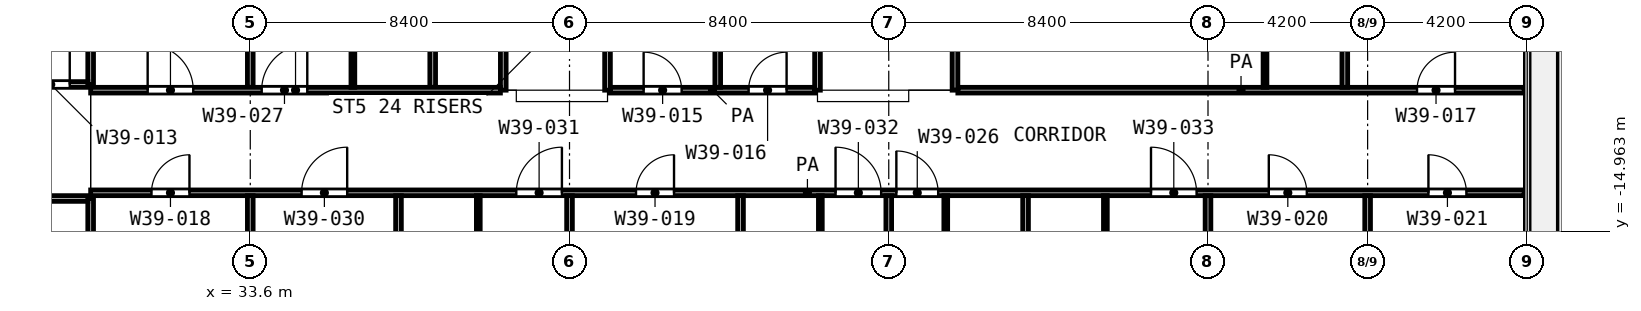
"""IFC4 building model, lengths in metres.
Left out: names, types, materials, properties, quantities, classifications, styles, units other than length and angle.
Written with IfcOpenShell. Run it as: python <this file> out.ifc"""

import sys

from ifc_helpers import new_model, si_unit, direction, frame, frame_2d, origin, place, context, subcontext, project, spatial, rectangle, extrude, element, fill, save


model = new_model("IFC4")
c1 = context("Model", 3, precision=1e-05, world=origin(), true_north=direction((0.0, 1.0)))
c2 = subcontext(c1, "Body", "Model", "MODEL_VIEW")
j1 = project(units=[si_unit("LENGTHUNIT", "METRE"), si_unit("PLANEANGLEUNIT", "RADIAN")], contexts=[c1])
p1 = place(None, origin())
s1 = spatial("IfcSite", under=j1, at=p1, CompositionType="ELEMENT")
p2 = place(p1, origin())
s2 = spatial("IfcBuilding", under=s1, at=p2, CompositionType="ELEMENT")
p3 = place(p2, frame((0.0, 0.0, 171.0)))
s3 = spatial("IfcBuildingStorey", under=s2, at=p3, CompositionType="ELEMENT", Elevation=171.0)
for number, where, z_axis, x_axis in (
    (1, (36.3, -11.175, 0.0), (0.0, 0.0, 1.0), (0.0, 1.0, 0.0)),
    (2, (39.6, -16.65, 0.0), (0.0, 0.0, 1.0), (0.0, 1.0, 0.0)),
    (3, (48.6, -16.65, 0.0), (0.0, 0.0, 1.0), (0.0, 1.0, 0.0)),
    (4, (51.9, -16.65, 0.0), (0.0, 0.0, 1.0), (0.0, 1.0, 0.0)),
    (5, (56.1, -16.65, 0.0), (0.0, 0.0, 1.0), (0.0, 1.0, 0.0)),
):
    element("IfcWall", number, at=place(p3, frame(where, z_axis=z_axis, x_axis=x_axis)), inside=s3, PredefinedType="PARTITIONING", context=c2, shape_type="SweptSolid", body=[
        extrude(rectangle(XDim=2.625, YDim=0.1, at=frame_2d((1.312, 0.0))), origin(), (0.0, 0.0, 1.0), 3.6),
    ])
p4 = place(p3, frame((60.3, -11.175, 0.0), z_axis=(0.0, 0.0, 1.0), x_axis=(0.0, 1.0, 0.0)))
e6 = element("IfcWall", 6, at=p4, inside=s3, PredefinedType="PARTITIONING", context=c2, shape_type="SweptSolid", body=[
    extrude(rectangle(XDim=2.624, YDim=0.1, at=frame_2d((1.312, 0.0))), origin(), (0.0, 0.0, 1.0), 3.6),
])
p5 = place(p3, frame((24.9, -14.1, 0.0), z_axis=(0.0, 0.0, 1.0), x_axis=(1.0, 0.0, 0.0)))
e7 = element("IfcWall", 7, at=p5, inside=s3, PredefinedType="PARTITIONING", context=c2, shape_type="SweptSolid", body=[
    extrude(rectangle(XDim=4.425, YDim=0.15, at=frame_2d((2.212, 0.0))), origin(), (0.0, 0.0, 1.0), 3.6),
])
p6 = place(p5, frame((1.65, 0.0, 0.0)))
e8 = element("IfcOpeningElement", 8, at=p6, cuts=e7, PredefinedType="OPENING", context=c2, shape_type="SweptSolid", body=[
    extrude(rectangle(XDim=1.5, YDim=2.1, at=frame_2d((0.75, 1.05))), frame((0.0, 0.085, 0.0), z_axis=(0.0, -1.0, 0.0), x_axis=(1.0, 0.0, 0.0)), (0.0, 0.0, 1.0), 0.17),
])
p7 = place(p3, frame((29.4, -13.95, 0.0), z_axis=(0.0, 0.0, 1.0), x_axis=(1.0, 0.0, 0.0)))
e9 = element("IfcWall", 9, at=p7, inside=s3, PredefinedType="PARTITIONING", context=c2, shape_type="SweptSolid", body=[
    extrude(rectangle(XDim=37.72, YDim=0.15, at=frame_2d((18.86, 0.0))), origin(), (0.0, 0.0, 1.0), 3.6),
])
p8 = place(p7, frame((1.6, 0.0, 0.0)))
e10 = element("IfcOpeningElement", 10, at=p8, cuts=e9, PredefinedType="OPENING", context=c2, shape_type="SweptSolid", body=[
    extrude(rectangle(XDim=1.0, YDim=2.1, at=frame_2d((0.5, 1.05))), frame((0.0, 0.085, 0.0), z_axis=(0.0, -1.0, 0.0), x_axis=(1.0, 0.0, 0.0)), (0.0, 0.0, 1.0), 0.17),
])
p9 = place(p7, frame((5.55, 0.0, 0.0)))
e11 = element("IfcOpeningElement", 11, at=p9, cuts=e9, PredefinedType="OPENING", context=c2, shape_type="SweptSolid", body=[
    extrude(rectangle(XDim=1.2, YDim=2.1, at=frame_2d((0.6, 1.05))), frame((0.0, 0.085, 0.0), z_axis=(0.0, -1.0, 0.0), x_axis=(1.0, 0.0, 0.0)), (0.0, 0.0, 1.0), 0.17),
])
p10 = place(p7, frame((11.2, 0.0, 0.0)))
e12 = element("IfcOpeningElement", 12, at=p10, cuts=e9, PredefinedType="OPENING", context=c2, shape_type="SweptSolid", body=[
    extrude(rectangle(XDim=1.2, YDim=2.1, at=frame_2d((0.6, 1.05))), frame((0.0, 0.085, 0.0), z_axis=(0.0, -1.0, 0.0), x_axis=(1.0, 0.0, 0.0)), (0.0, 0.0, 1.0), 0.17),
])
p11 = place(p7, frame((14.35, 0.0, 0.0)))
e13 = element("IfcOpeningElement", 13, at=p11, cuts=e9, PredefinedType="OPENING", context=c2, shape_type="SweptSolid", body=[
    extrude(rectangle(XDim=1.0, YDim=2.1, at=frame_2d((0.5, 1.05))), frame((0.0, 0.085, 0.0), z_axis=(0.0, -1.0, 0.0), x_axis=(1.0, 0.0, 0.0)), (0.0, 0.0, 1.0), 0.17),
])
p12 = place(p7, frame((19.6, 0.0, 0.0)))
e14 = element("IfcOpeningElement", 14, at=p12, cuts=e9, PredefinedType="OPENING", context=c2, shape_type="SweptSolid", body=[
    extrude(rectangle(XDim=1.2, YDim=2.1, at=frame_2d((0.6, 1.05))), frame((0.0, 0.085, 0.0), z_axis=(0.0, -1.0, 0.0), x_axis=(1.0, 0.0, 0.0)), (0.0, 0.0, 1.0), 0.17),
])
p13 = place(p7, frame((21.2, 0.0, 0.0)))
e15 = element("IfcOpeningElement", 15, at=p13, cuts=e9, PredefinedType="OPENING", context=c2, shape_type="SweptSolid", body=[
    extrude(rectangle(XDim=1.1, YDim=2.1, at=frame_2d((0.55, 1.05))), frame((0.0, 0.085, 0.0), z_axis=(0.0, -1.0, 0.0), x_axis=(1.0, 0.0, 0.0)), (0.0, 0.0, 1.0), 0.17),
])
p14 = place(p7, frame((27.9, 0.0, 0.0)))
e16 = element("IfcOpeningElement", 16, at=p14, cuts=e9, PredefinedType="OPENING", context=c2, shape_type="SweptSolid", body=[
    extrude(rectangle(XDim=1.2, YDim=2.1, at=frame_2d((0.6, 1.05))), frame((0.0, 0.085, 0.0), z_axis=(0.0, -1.0, 0.0), x_axis=(1.0, 0.0, 0.0)), (0.0, 0.0, 1.0), 0.17),
])
p15 = place(p7, frame((31.0, 0.0, 0.0)))
e17 = element("IfcOpeningElement", 17, at=p15, cuts=e9, PredefinedType="OPENING", context=c2, shape_type="SweptSolid", body=[
    extrude(rectangle(XDim=1.0, YDim=2.1, at=frame_2d((0.5, 1.05))), frame((0.0, 0.085, 0.0), z_axis=(0.0, -1.0, 0.0), x_axis=(1.0, 0.0, 0.0)), (0.0, 0.0, 1.0), 0.17),
])
p16 = place(p7, frame((35.2, 0.0, 0.0)))
e18 = element("IfcOpeningElement", 18, at=p16, cuts=e9, PredefinedType="OPENING", context=c2, shape_type="SweptSolid", body=[
    extrude(rectangle(XDim=1.0, YDim=2.1, at=frame_2d((0.5, 1.05))), frame((0.0, 0.085, 0.0), z_axis=(0.0, -1.0, 0.0), x_axis=(1.0, 0.0, 0.0)), (0.0, 0.0, 1.0), 0.17),
])
p17 = place(p3, frame((29.4, -11.25, 0.0), z_axis=(0.0, 0.0, 1.0), x_axis=(1.0, 0.0, 0.0)))
e19 = element("IfcWall", 19, at=p17, inside=s3, PredefinedType="PARTITIONING", context=c2, shape_type="SweptSolid", body=[
    extrude(rectangle(XDim=10.782, YDim=0.15, at=frame_2d((5.391, 0.0))), origin(), (0.0, 0.0, 1.0), 3.6),
])
p18 = place(p17, frame((4.5, 0.0, 0.0)))
e20 = element("IfcOpeningElement", 20, at=p18, cuts=e19, PredefinedType="OPENING", context=c2, shape_type="SweptSolid", body=[
    extrude(rectangle(XDim=1.2, YDim=2.1, at=frame_2d((0.6, 1.05))), frame((0.0, 0.085, 0.0), z_axis=(0.0, -1.0, 0.0), x_axis=(1.0, 0.0, 0.0)), (0.0, 0.0, 1.0), 0.17),
])
p19 = place(p17, frame((1.5, 0.0, 0.0)))
e21 = element("IfcOpeningElement", 21, at=p19, cuts=e19, PredefinedType="OPENING", context=c2, shape_type="SweptSolid", body=[
    extrude(rectangle(XDim=1.2, YDim=2.1, at=frame_2d((0.6, 1.05))), frame((0.0, 0.085, 0.0), z_axis=(0.0, -1.0, 0.0), x_axis=(1.0, 0.0, 0.0)), (0.0, 0.0, 1.0), 0.17),
])
p20 = place(p3, frame((43.075, -11.25, 0.0), z_axis=(0.0, 0.0, 1.0), x_axis=(1.0, 0.0, 0.0)))
e22 = element("IfcWall", 22, at=p20, inside=s3, PredefinedType="PARTITIONING", context=c2, shape_type="SweptSolid", body=[
    extrude(rectangle(XDim=5.375, YDim=0.15, at=frame_2d((2.688, 0.0))), origin(), (0.0, 0.0, 1.0), 3.6),
])
p21 = place(p20, frame((0.875, 0.0, 0.0)))
e23 = element("IfcOpeningElement", 23, at=p21, cuts=e22, PredefinedType="OPENING", context=c2, shape_type="SweptSolid", body=[
    extrude(rectangle(XDim=1.0, YDim=2.1, at=frame_2d((0.5, 1.05))), frame((0.0, 0.085, 0.0), z_axis=(0.0, -1.0, 0.0), x_axis=(1.0, 0.0, 0.0)), (0.0, 0.0, 1.0), 0.17),
])
p22 = place(p20, frame((3.637, 0.0, 0.0)))
e24 = element("IfcOpeningElement", 24, at=p22, cuts=e22, PredefinedType="OPENING", context=c2, shape_type="SweptSolid", body=[
    extrude(rectangle(XDim=1.0, YDim=2.1, at=frame_2d((0.5, 1.05))), frame((0.0, 0.085, 0.0), z_axis=(0.0, -1.0, 0.0), x_axis=(1.0, 0.0, 0.0)), (0.0, 0.0, 1.0), 0.17),
])
p23 = place(p3, frame((52.218, -11.25, 0.0), z_axis=(0.0, 0.0, 1.0), x_axis=(1.0, 0.0, 0.0)))
e25 = element("IfcWall", 25, at=p23, inside=s3, PredefinedType="PARTITIONING", context=c2, shape_type="SweptSolid", body=[
    extrude(rectangle(XDim=14.902, YDim=0.15, at=frame_2d((7.451, 0.0))), origin(), (0.0, 0.0, 1.0), 3.6),
])
p24 = place(p23, frame((12.082, 0.0, 0.0)))
e26 = element("IfcOpeningElement", 26, at=p24, cuts=e25, PredefinedType="OPENING", context=c2, shape_type="SweptSolid", body=[
    extrude(rectangle(XDim=1.0, YDim=2.1, at=frame_2d((0.5, 1.05))), frame((0.0, 0.085, 0.0), z_axis=(0.0, -1.0, 0.0), x_axis=(1.0, 0.0, 0.0)), (0.0, 0.0, 1.0), 0.17),
])
p25 = place(p3, frame((24.9, -11.1, 0.0), z_axis=(0.0, 0.0, 1.0), x_axis=(1.0, 0.0, 0.0)))
e27 = element("IfcWall", 27, at=p25, inside=s3, PredefinedType="PARTITIONING", context=c2, shape_type="SweptSolid", body=[
    extrude(rectangle(XDim=4.425, YDim=0.15, at=frame_2d((2.212, 0.0))), origin(), (0.0, 0.0, 1.0), 3.6),
])
p26 = place(p25, frame((0.9, 0.0, 0.0)))
e28 = element("IfcOpeningElement", 28, at=p26, cuts=e27, PredefinedType="OPENING", context=c2, shape_type="SweptSolid", body=[
    extrude(rectangle(XDim=0.9, YDim=2.1, at=frame_2d((0.45, 1.05))), frame((0.0, 0.085, 0.0), z_axis=(0.0, -1.0, 0.0), x_axis=(1.0, 0.0, 0.0)), (0.0, 0.0, 1.0), 0.17),
])
p27 = place(p25, frame((2.95, 0.0, 0.0)))
e29 = element("IfcOpeningElement", 29, at=p27, cuts=e27, PredefinedType="OPENING", context=c2, shape_type="SweptSolid", body=[
    extrude(rectangle(XDim=1.0, YDim=2.1, at=frame_2d((0.5, 1.05))), frame((0.0, 0.085, 0.0), z_axis=(0.0, -1.0, 0.0), x_axis=(1.0, 0.0, 0.0)), (0.0, 0.0, 1.0), 0.17),
])
p28 = place(p3, frame((29.4, -31.198, 0.0), z_axis=(0.0, 0.0, 1.0), x_axis=(0.0, 1.0, 0.0)))
e30 = element("IfcWall", 30, at=p28, inside=s3, PredefinedType="PARTITIONING", context=c2, shape_type="SweptSolid", body=[
    extrude(rectangle(XDim=17.098, YDim=0.15, at=frame_2d((8.549, 0.0))), origin(), (0.0, 0.0, 1.0), 3.6),
])
p29 = place(p3, frame((29.4, -11.1, 0.0), z_axis=(0.0, 0.0, 1.0), x_axis=(0.0, 1.0, 0.0)))
e31 = element("IfcWall", 31, at=p29, inside=s3, PredefinedType="PARTITIONING", context=c2, shape_type="SweptSolid", body=[
    extrude(rectangle(XDim=11.02, YDim=0.15, at=frame_2d((5.51, 0.0))), origin(), (0.0, 0.0, 1.0), 2.7),
])
p30 = place(p3, frame((33.6, -31.12, 0.0), z_axis=(0.0, 0.0, 1.0), x_axis=(0.0, 1.0, 0.0)))
e32 = element("IfcWall", 32, at=p30, inside=s3, PredefinedType="PARTITIONING", context=c2, shape_type="SweptSolid", body=[
    extrude(rectangle(XDim=17.095, YDim=0.15, at=frame_2d((8.548, 0.0))), origin(), (0.0, 0.0, 1.0), 3.6),
])
p31 = place(p3, frame((33.6, -11.175, 0.0), z_axis=(0.0, 0.0, 1.0), x_axis=(0.0, 1.0, 0.0)))
e33 = element("IfcWall", 33, at=p31, inside=s3, PredefinedType="PARTITIONING", context=c2, shape_type="SweptSolid", body=[
    extrude(rectangle(XDim=11.095, YDim=0.15, at=frame_2d((5.547, 0.0))), origin(), (0.0, 0.0, 1.0), 3.6),
])
p32 = place(p3, frame((37.5, -31.12, 0.0), z_axis=(0.0, 0.0, 1.0), x_axis=(0.0, 1.0, 0.0)))
e34 = element("IfcWall", 34, at=p32, inside=s3, PredefinedType="PARTITIONING", context=c2, shape_type="SweptSolid", body=[
    extrude(rectangle(XDim=17.095, YDim=0.15, at=frame_2d((8.548, 0.0))), origin(), (0.0, 0.0, 1.0), 3.6),
])
p33 = place(p3, frame((38.4, -11.175, 0.0), z_axis=(0.0, 0.0, 1.0), x_axis=(0.0, 1.0, 0.0)))
e35 = element("IfcWall", 35, at=p33, inside=s3, PredefinedType="PARTITIONING", context=c2, shape_type="SweptSolid", body=[
    extrude(rectangle(XDim=11.095, YDim=0.15, at=frame_2d((5.547, 0.0))), origin(), (0.0, 0.0, 1.0), 2.7),
])
p34 = place(p3, frame((40.257, -11.25, 0.0), z_axis=(0.0, 0.0, 1.0), x_axis=(0.0, 1.0, 0.0)))
e36 = element("IfcWall", 36, at=p34, inside=s3, PredefinedType="PARTITIONING", context=c2, shape_type="SweptSolid", body=[
    extrude(rectangle(XDim=11.17, YDim=0.15, at=frame_2d((5.585, 0.0))), origin(), (0.0, 0.0, 1.0), 2.7),
])
p35 = place(p34, frame((4.95, 0.0, 0.0)))
e37 = element("IfcOpeningElement", 37, at=p35, cuts=e36, PredefinedType="OPENING", context=c2, shape_type="SweptSolid", body=[
    extrude(rectangle(XDim=1.0, YDim=2.1, at=frame_2d((0.5, 1.05))), frame((0.0, 0.085, 0.0), z_axis=(0.0, -1.0, 0.0), x_axis=(1.0, 0.0, 0.0)), (0.0, 0.0, 1.0), 0.17),
])
p36 = place(p3, frame((42.0, -31.12, 0.0), z_axis=(0.0, 0.0, 1.0), x_axis=(0.0, 1.0, 0.0)))
e38 = element("IfcWall", 38, at=p36, inside=s3, PredefinedType="PARTITIONING", context=c2, shape_type="SweptSolid", body=[
    extrude(rectangle(XDim=17.095, YDim=0.15, at=frame_2d((8.548, 0.0))), origin(), (0.0, 0.0, 1.0), 3.6),
])
p37 = place(p3, frame((43.0, -11.25, 0.0), z_axis=(0.0, 0.0, 1.0), x_axis=(0.0, 1.0, 0.0)))
e39 = element("IfcWall", 39, at=p37, inside=s3, PredefinedType="PARTITIONING", context=c2, shape_type="SweptSolid", body=[
    extrude(rectangle(XDim=2.348, YDim=0.15, at=frame_2d((1.174, 0.0))), origin(), (0.0, 0.0, 1.0), 3.6),
])
p38 = place(p3, frame((45.9, -11.175, 0.0), z_axis=(0.0, 0.0, 1.0), x_axis=(0.0, 1.0, 0.0)))
e40 = element("IfcWall", 40, at=p38, inside=s3, PredefinedType="PARTITIONING", context=c2, shape_type="SweptSolid", body=[
    extrude(rectangle(XDim=2.525, YDim=0.15, at=frame_2d((1.263, 0.0))), origin(), (0.0, 0.0, 1.0), 3.6),
])
p39 = place(p3, frame((46.5, -31.12, 0.0), z_axis=(0.0, 0.0, 1.0), x_axis=(0.0, 1.0, 0.0)))
e41 = element("IfcWall", 41, at=p39, inside=s3, PredefinedType="PARTITIONING", context=c2, shape_type="SweptSolid", body=[
    extrude(rectangle(XDim=17.095, YDim=0.15, at=frame_2d((8.548, 0.0))), origin(), (0.0, 0.0, 1.0), 3.6),
])
p40 = place(p3, frame((48.525, -11.25, 0.0), z_axis=(0.0, 0.0, 1.0), x_axis=(0.0, 1.0, 0.0)))
e42 = element("IfcWall", 42, at=p40, inside=s3, PredefinedType="PARTITIONING", context=c2, shape_type="SweptSolid", body=[
    extrude(rectangle(XDim=2.6, YDim=0.15, at=frame_2d((1.3, 0.0))), origin(), (0.0, 0.0, 1.0), 3.6),
])
p41 = place(p3, frame((50.4, -31.12, 0.0), z_axis=(0.0, 0.0, 1.0), x_axis=(0.0, 1.0, 0.0)))
e43 = element("IfcWall", 43, at=p41, inside=s3, PredefinedType="PARTITIONING", context=c2, shape_type="SweptSolid", body=[
    extrude(rectangle(XDim=17.095, YDim=0.15, at=frame_2d((8.548, 0.0))), origin(), (0.0, 0.0, 1.0), 3.6),
])
p42 = place(p3, frame((52.143, -11.25, 0.0), z_axis=(0.0, 0.0, 1.0), x_axis=(0.0, 1.0, 0.0)))
e44 = element("IfcWall", 44, at=p42, inside=s3, PredefinedType="PARTITIONING", context=c2, shape_type="SweptSolid", body=[
    extrude(rectangle(XDim=9.398, YDim=0.15, at=frame_2d((4.699, 0.0))), origin(), (0.0, 0.0, 1.0), 3.6),
])
p43 = place(p42, frame((5.665, 0.0, 0.0)))
e45 = element("IfcOpeningElement", 45, at=p43, cuts=e44, PredefinedType="OPENING", context=c2, shape_type="SweptSolid", body=[
    extrude(rectangle(XDim=1.2, YDim=2.1, at=frame_2d((0.6, 1.05))), frame((0.0, 0.085, 0.0), z_axis=(0.0, -1.0, 0.0), x_axis=(1.0, 0.0, 0.0)), (0.0, 0.0, 1.0), 0.17),
])
p44 = place(p42, frame((3.333, 0.0, 0.0)))
e46 = element("IfcOpeningElement", 46, at=p44, cuts=e44, PredefinedType="OPENING", context=c2, shape_type="SweptSolid", body=[
    extrude(rectangle(XDim=1.2, YDim=2.1, at=frame_2d((0.6, 1.05))), frame((0.0, 0.085, 0.0), z_axis=(0.0, -1.0, 0.0), x_axis=(1.0, 0.0, 0.0)), (0.0, 0.0, 1.0), 0.17),
])
for number, where, z_axis, x_axis in (
    (47, (54.0, -31.12, 0.0), (0.0, 0.0, 1.0), (0.0, 1.0, 0.0)),
    (48, (58.8, -31.12, 0.0), (0.0, 0.0, 1.0), (0.0, 1.0, 0.0)),
):
    element("IfcWall", number, at=place(p3, frame(where, z_axis=z_axis, x_axis=x_axis)), inside=s3, PredefinedType="PARTITIONING", context=c2, shape_type="SweptSolid", body=[
        extrude(rectangle(XDim=17.095, YDim=0.15, at=frame_2d((8.548, 0.0))), origin(), (0.0, 0.0, 1.0), 3.6),
    ])
p45 = place(p3, frame((62.4, -11.175, 0.0), z_axis=(0.0, 0.0, 1.0), x_axis=(0.0, 1.0, 0.0)))
e49 = element("IfcWall", 49, at=p45, inside=s3, PredefinedType="PARTITIONING", context=c2, shape_type="SweptSolid", body=[
    extrude(rectangle(XDim=9.862, YDim=0.15, at=frame_2d((4.931, 0.0))), origin(), (0.0, 0.0, 1.0), 2.7),
])
p46 = place(p3, frame((63.0, -29.287, 0.0), z_axis=(0.0, 0.0, 1.0), x_axis=(0.0, 1.0, 0.0)))
e50 = element("IfcWall", 50, at=p46, inside=s3, PredefinedType="PARTITIONING", context=c2, shape_type="SweptSolid", body=[
    extrude(rectangle(XDim=15.262, YDim=0.15, at=frame_2d((7.631, 0.0))), origin(), (0.0, 0.0, 1.0), 3.6),
])
p47 = place(p18, origin())
e51 = element("IfcDoor", 51, at=p47, inside=s3, OperationType="SINGLE_SWING_RIGHT", PredefinedType="DOOR", context=c2, shape_type="SweptSolid", body=[
    extrude(rectangle(XDim=1.2, YDim=2.1, at=frame_2d((0.6, 1.05))), frame((0.0, 0.025, 0.0), z_axis=(0.0, -1.0, 0.0), x_axis=(1.0, 0.0, 0.0)), (0.0, 0.0, 1.0), 0.05),
])
fill(e20, e51)
p48 = place(p21, origin())
e52 = element("IfcDoor", 52, at=p48, inside=s3, OperationType="SINGLE_SWING_LEFT", PredefinedType="DOOR", context=c2, shape_type="SweptSolid", body=[
    extrude(rectangle(XDim=1.0, YDim=2.1, at=frame_2d((0.5, 1.05))), frame((0.0, 0.025, 0.0), z_axis=(0.0, -1.0, 0.0), x_axis=(1.0, 0.0, 0.0)), (0.0, 0.0, 1.0), 0.05),
])
fill(e23, e52)
p49 = place(p22, origin())
e53 = element("IfcDoor", 53, at=p49, inside=s3, OperationType="SINGLE_SWING_RIGHT", PredefinedType="DOOR", context=c2, shape_type="SweptSolid", body=[
    extrude(rectangle(XDim=1.0, YDim=2.1, at=frame_2d((0.5, 1.05))), frame((0.0, 0.025, 0.0), z_axis=(0.0, -1.0, 0.0), x_axis=(1.0, 0.0, 0.0)), (0.0, 0.0, 1.0), 0.05),
])
fill(e24, e53)
p50 = place(p24, origin())
e54 = element("IfcDoor", 54, at=p50, inside=s3, OperationType="SINGLE_SWING_RIGHT", PredefinedType="DOOR", context=c2, shape_type="SweptSolid", body=[
    extrude(rectangle(XDim=1.0, YDim=2.1, at=frame_2d((0.5, 1.05))), frame((0.0, 0.025, 0.0), z_axis=(0.0, -1.0, 0.0), x_axis=(1.0, 0.0, 0.0)), (0.0, 0.0, 1.0), 0.05),
])
fill(e26, e54)
p51 = place(p8, origin())
e55 = element("IfcDoor", 55, at=p51, inside=s3, OperationType="SINGLE_SWING_RIGHT", PredefinedType="DOOR", context=c2, shape_type="SweptSolid", body=[
    extrude(rectangle(XDim=1.0, YDim=2.1, at=frame_2d((0.5, 1.05))), frame((0.0, 0.025, 0.0), z_axis=(0.0, -1.0, 0.0), x_axis=(1.0, 0.0, 0.0)), (0.0, 0.0, 1.0), 0.05),
])
fill(e10, e55)
p52 = place(p9, origin())
e56 = element("IfcDoor", 56, at=p52, inside=s3, OperationType="SINGLE_SWING_RIGHT", PredefinedType="DOOR", context=c2, shape_type="SweptSolid", body=[
    extrude(rectangle(XDim=1.2, YDim=2.1, at=frame_2d((0.6, 1.05))), frame((0.0, 0.025, 0.0), z_axis=(0.0, -1.0, 0.0), x_axis=(1.0, 0.0, 0.0)), (0.0, 0.0, 1.0), 0.05),
])
fill(e11, e56)
p53 = place(p10, origin())
e57 = element("IfcDoor", 57, at=p53, inside=s3, OperationType="SINGLE_SWING_RIGHT", PredefinedType="DOOR", context=c2, shape_type="SweptSolid", body=[
    extrude(rectangle(XDim=1.2, YDim=2.1, at=frame_2d((0.6, 1.05))), frame((0.0, 0.025, 0.0), z_axis=(0.0, -1.0, 0.0), x_axis=(1.0, 0.0, 0.0)), (0.0, 0.0, 1.0), 0.05),
])
fill(e12, e57)
p54 = place(p11, origin())
e58 = element("IfcDoor", 58, at=p54, inside=s3, OperationType="SINGLE_SWING_RIGHT", PredefinedType="DOOR", context=c2, shape_type="SweptSolid", body=[
    extrude(rectangle(XDim=1.0, YDim=2.1, at=frame_2d((0.5, 1.05))), frame((0.0, 0.025, 0.0), z_axis=(0.0, -1.0, 0.0), x_axis=(1.0, 0.0, 0.0)), (0.0, 0.0, 1.0), 0.05),
])
fill(e13, e58)
p55 = place(p12, origin())
e59 = element("IfcDoor", 59, at=p55, inside=s3, OperationType="SINGLE_SWING_LEFT", PredefinedType="DOOR", context=c2, shape_type="SweptSolid", body=[
    extrude(rectangle(XDim=1.2, YDim=2.1, at=frame_2d((0.6, 1.05))), frame((0.0, 0.025, 0.0), z_axis=(0.0, -1.0, 0.0), x_axis=(1.0, 0.0, 0.0)), (0.0, 0.0, 1.0), 0.05),
])
fill(e14, e59)
p56 = place(p13, origin())
e60 = element("IfcDoor", 60, at=p56, inside=s3, OperationType="SINGLE_SWING_LEFT", PredefinedType="DOOR", context=c2, shape_type="SweptSolid", body=[
    extrude(rectangle(XDim=1.1, YDim=2.1, at=frame_2d((0.55, 1.05))), frame((0.0, 0.025, 0.0), z_axis=(0.0, -1.0, 0.0), x_axis=(1.0, 0.0, 0.0)), (0.0, 0.0, 1.0), 0.05),
])
fill(e15, e60)
p57 = place(p14, origin())
e61 = element("IfcDoor", 61, at=p57, inside=s3, OperationType="SINGLE_SWING_LEFT", PredefinedType="DOOR", context=c2, shape_type="SweptSolid", body=[
    extrude(rectangle(XDim=1.2, YDim=2.1, at=frame_2d((0.6, 1.05))), frame((0.0, 0.025, 0.0), z_axis=(0.0, -1.0, 0.0), x_axis=(1.0, 0.0, 0.0)), (0.0, 0.0, 1.0), 0.05),
])
fill(e16, e61)
p58 = place(p15, origin())
e62 = element("IfcDoor", 62, at=p58, inside=s3, OperationType="SINGLE_SWING_LEFT", PredefinedType="DOOR", context=c2, shape_type="SweptSolid", body=[
    extrude(rectangle(XDim=1.0, YDim=2.1, at=frame_2d((0.5, 1.05))), frame((0.0, 0.025, 0.0), z_axis=(0.0, -1.0, 0.0), x_axis=(1.0, 0.0, 0.0)), (0.0, 0.0, 1.0), 0.05),
])
fill(e17, e62)
p59 = place(p16, origin())
e63 = element("IfcDoor", 63, at=p59, inside=s3, OperationType="SINGLE_SWING_LEFT", PredefinedType="DOOR", context=c2, shape_type="SweptSolid", body=[
    extrude(rectangle(XDim=1.0, YDim=2.1, at=frame_2d((0.5, 1.05))), frame((0.0, 0.025, 0.0), z_axis=(0.0, -1.0, 0.0), x_axis=(1.0, 0.0, 0.0)), (0.0, 0.0, 1.0), 0.05),
])
fill(e18, e63)
p60 = place(p27, origin())
e64 = element("IfcDoor", 64, at=p60, inside=s3, OperationType="SINGLE_SWING_RIGHT", PredefinedType="DOOR", context=c2, shape_type="SweptSolid", body=[
    extrude(rectangle(XDim=1.0, YDim=2.1, at=frame_2d((0.5, 1.05))), frame((0.0, 0.025, 0.0), z_axis=(0.0, -1.0, 0.0), x_axis=(1.0, 0.0, 0.0)), (0.0, 0.0, 1.0), 0.05),
])
fill(e29, e64)
p61 = place(p19, origin())
e65 = element("IfcDoor", 65, at=p61, inside=s3, OperationType="SINGLE_SWING_LEFT", PredefinedType="DOOR", context=c2, shape_type="SweptSolid", body=[
    extrude(rectangle(XDim=1.2, YDim=2.1, at=frame_2d((0.6, 1.05))), frame((0.0, 0.025, 0.0), z_axis=(0.0, -1.0, 0.0), x_axis=(1.0, 0.0, 0.0)), (0.0, 0.0, 1.0), 0.05),
])
fill(e21, e65)
save(model, sys.argv[1])
